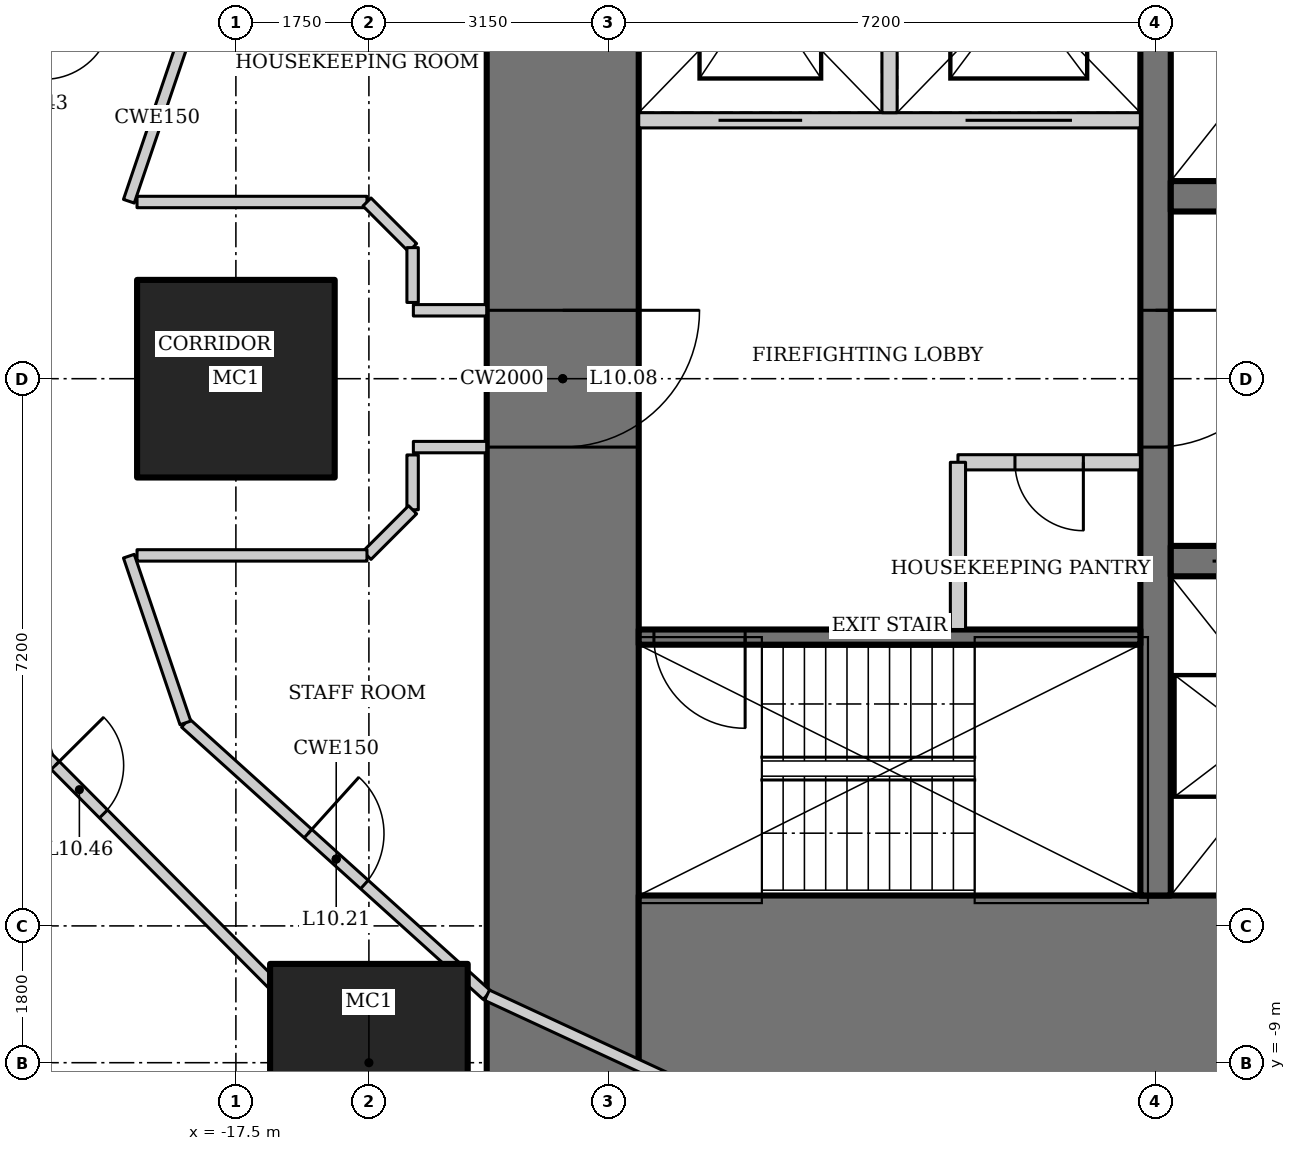
"""IFC4 building model, lengths in metres.
Left out: names, types, materials, properties, quantities, classifications, styles, units other than length and angle.
Written with IfcOpenShell. Run it as: python <this file> out.ifc"""

import sys

from ifc_helpers import new_model, si_unit, direction, frame, frame_2d, origin, origin_2d, place, context, subcontext, project, spatial, rectangle, hollow_rectangle, extrude, element, fill, save


model = new_model("IFC4")
c1 = context("Model", 3, precision=1e-05, world=origin(), true_north=direction((0.0, 1.0)))
c2 = subcontext(c1, "Body", "Model", "MODEL_VIEW")
j1 = project(units=[si_unit("LENGTHUNIT", "METRE"), si_unit("PLANEANGLEUNIT", "RADIAN")], contexts=[c1])
p1 = place(None, origin())
s1 = spatial("IfcSite", under=j1, at=p1, CompositionType="ELEMENT")
p2 = place(p1, origin())
s2 = spatial("IfcBuilding", under=s1, at=p2, CompositionType="ELEMENT")
p3 = place(p2, frame((0.0, 0.0, 51.4)))
s3 = spatial("IfcBuildingStorey", under=s2, at=p3, CompositionType="ELEMENT", Elevation=51.4)
for number, where, z_axis, x_axis in (
    (1, (-17.5, 0.0, 0.0), (0.0, 0.0, 1.0), (1.0, 0.0, 0.0)),
    (2, (-15.75, -9.0, 0.0), (0.0, 0.0, 1.0), (1.0, 0.0, 0.0)),
):
    element("IfcColumn", number, at=place(p3, frame(where, z_axis=z_axis, x_axis=x_axis)), inside=s3, PredefinedType="COLUMN", context=c2, shape_type="SweptSolid", body=[
        extrude(hollow_rectangle(XDim=2.6, YDim=2.6, WallThickness=0.13, at=origin_2d()), origin(), (0.0, 0.0, 1.0), 3.6),
    ])
p4 = place(p3, frame((-13.2, 13.0, 0.0), z_axis=(0.0, 0.0, 1.0), x_axis=(0.0, -1.0, 0.0)))
e3 = element("IfcWall", 3, at=p4, inside=s3, PredefinedType="SHEAR", context=c2, shape_type="SweptSolid", body=[
    extrude(rectangle(XDim=26.0, YDim=2.0, at=frame_2d((13.0, 0.0))), origin(), (0.0, 0.0, 1.0), 3.6),
])
p5 = place(p4, frame((12.1, 0.0, 0.0)))
e4 = element("IfcOpeningElement", 4, at=p5, cuts=e3, PredefinedType="OPENING", context=c2, shape_type="SweptSolid", body=[
    extrude(rectangle(XDim=1.8, YDim=2.1, at=frame_2d((0.9, 1.05))), frame((0.0, 1.01, 0.0), z_axis=(0.0, -1.0, 0.0), x_axis=(1.0, 0.0, 0.0)), (0.0, 0.0, 1.0), 2.02),
])
p6 = place(p3, frame((-12.2, -8.0, 0.0), z_axis=(0.0, 0.0, 1.0), x_axis=(1.0, 0.0, 0.0)))
e5 = element("IfcWall", 5, at=p6, inside=s3, PredefinedType="SHEAR", context=c2, shape_type="SweptSolid", body=[
    extrude(rectangle(XDim=24.4, YDim=2.4, at=frame_2d((12.2, 0.0))), origin(), (0.0, 0.0, 1.0), 3.6),
])
p7 = place(p3, frame((-5.4, 6.8, 0.0), z_axis=(0.0, 0.0, 1.0), x_axis=(0.0, -1.0, 0.0)))
e6 = element("IfcWall", 6, at=p7, inside=s3, PredefinedType="SHEAR", context=c2, shape_type="SweptSolid", body=[
    extrude(rectangle(XDim=13.6, YDim=0.4, at=frame_2d((6.8, 0.0))), origin(), (0.0, 0.0, 1.0), 3.6),
])
p8 = place(p7, frame((5.9, 0.0, 0.0)))
e7 = element("IfcOpeningElement", 7, at=p8, cuts=e6, PredefinedType="OPENING", context=c2, shape_type="SweptSolid", body=[
    extrude(rectangle(XDim=1.8, YDim=2.1, at=frame_2d((0.9, 1.05))), frame((0.0, 0.21, 0.0), z_axis=(0.0, -1.0, 0.0), x_axis=(1.0, 0.0, 0.0)), (0.0, 0.0, 1.0), 0.42),
])
p9 = place(p3, frame((-5.2, -2.4, 0.0), z_axis=(0.0, 0.0, 1.0), x_axis=(1.0, 0.0, 0.0)))
e8 = element("IfcWall", 8, at=p9, inside=s3, PredefinedType="SHEAR", context=c2, shape_type="SweptSolid", body=[
    extrude(rectangle(XDim=10.4, YDim=0.4, at=frame_2d((5.2, 0.0))), origin(), (0.0, 0.0, 1.0), 3.6),
])
p10 = place(p9, frame((0.55, 0.0, 0.0)))
e9 = element("IfcOpeningElement", 9, at=p10, cuts=e8, PredefinedType="OPENING", context=c2, shape_type="SweptSolid", body=[
    extrude(rectangle(XDim=1.1, YDim=2.2, at=frame_2d((0.55, 1.1))), frame((0.0, 0.21, 0.0), z_axis=(0.0, -1.0, 0.0), x_axis=(1.0, 0.0, 0.0)), (0.0, 0.0, 1.0), 0.42),
])
p11 = place(p9, frame((4.083, 0.0, 0.0)))
e10 = element("IfcOpeningElement", 10, at=p11, cuts=e8, PredefinedType="OPENING", context=c2, shape_type="SweptSolid", body=[
    extrude(rectangle(XDim=1.1, YDim=2.2, at=frame_2d((0.55, 1.1))), frame((0.0, 0.21, 0.0), z_axis=(0.0, -1.0, 0.0), x_axis=(1.0, 0.0, 0.0)), (0.0, 0.0, 1.0), 0.42),
])
p12 = place(p9, frame((7.617, 0.0, 0.0)))
e11 = element("IfcOpeningElement", 11, at=p12, cuts=e8, PredefinedType="OPENING", context=c2, shape_type="SweptSolid", body=[
    extrude(rectangle(XDim=1.1, YDim=2.2, at=frame_2d((0.55, 1.1))), frame((0.0, 0.21, 0.0), z_axis=(0.0, -1.0, 0.0), x_axis=(1.0, 0.0, 0.0)), (0.0, 0.0, 1.0), 0.42),
])
p13 = place(p3, frame((5.2, 2.4, 0.0), z_axis=(0.0, 0.0, 1.0), x_axis=(-1.0, 0.0, 0.0)))
e12 = element("IfcWall", 12, at=p13, inside=s3, PredefinedType="SHEAR", context=c2, shape_type="SweptSolid", body=[
    extrude(rectangle(XDim=10.4, YDim=0.4, at=frame_2d((5.2, 0.0))), origin(), (0.0, 0.0, 1.0), 3.6),
])
p14 = place(p3, frame((-5.6, -3.4, 0.0), z_axis=(0.0, 0.0, 1.0), x_axis=(-1.0, 0.0, 0.0)))
e13 = element("IfcWall", 13, at=p14, inside=s3, PredefinedType="SHEAR", context=c2, shape_type="SweptSolid", body=[
    extrude(rectangle(XDim=6.6, YDim=0.2, at=frame_2d((3.3, 0.0))), origin(), (0.0, 0.0, 1.0), 3.6),
])
p15 = place(p14, frame((5.2, 0.0, 0.0)))
e14 = element("IfcOpeningElement", 14, at=p15, cuts=e13, PredefinedType="OPENING", context=c2, shape_type="SweptSolid", body=[
    extrude(rectangle(XDim=1.2, YDim=2.1, at=frame_2d((0.6, 1.05))), frame((0.0, 0.11, 0.0), z_axis=(0.0, -1.0, 0.0), x_axis=(1.0, 0.0, 0.0)), (0.0, 0.0, 1.0), 0.22),
])
p16 = place(p3, frame((-12.2, 3.4, 0.0), z_axis=(0.0, 0.0, 1.0), x_axis=(1.0, 0.0, 0.0)))
e15 = element("IfcWall", 15, at=p16, inside=s3, PredefinedType="SOLIDWALL", context=c2, shape_type="SweptSolid", body=[
    extrude(rectangle(XDim=6.6, YDim=0.2, at=frame_2d((3.3, 0.0))), origin(), (0.0, 0.0, 1.0), 3.6),
])
p17 = place(p16, frame((1.05, 0.0, 0.0)))
e16 = element("IfcOpeningElement", 16, at=p17, cuts=e15, PredefinedType="OPENING", context=c2, shape_type="SweptSolid", body=[
    extrude(rectangle(XDim=1.1, YDim=2.2, at=frame_2d((0.55, 1.1))), frame((0.0, 0.11, 0.0), z_axis=(0.0, -1.0, 0.0), x_axis=(1.0, 0.0, 0.0)), (0.0, 0.0, 1.0), 0.22),
])
p18 = place(p16, frame((4.3, 0.0, 0.0)))
e17 = element("IfcOpeningElement", 17, at=p18, cuts=e15, PredefinedType="OPENING", context=c2, shape_type="SweptSolid", body=[
    extrude(rectangle(XDim=1.4, YDim=2.2, at=frame_2d((0.7, 1.1))), frame((0.0, 0.11, 0.0), z_axis=(0.0, -1.0, 0.0), x_axis=(1.0, 0.0, 0.0)), (0.0, 0.0, 1.0), 0.22),
])
p19 = place(p3, frame((-8.9, 3.5, 0.0), z_axis=(0.0, 0.0, 1.0), x_axis=(0.0, 1.0, 0.0)))
e18 = element("IfcWall", 18, at=p19, inside=s3, PredefinedType="SOLIDWALL", context=c2, shape_type="SweptSolid", body=[
    extrude(rectangle(XDim=3.3, YDim=0.2, at=frame_2d((1.65, 0.0))), origin(), (0.0, 0.0, 1.0), 3.6),
])
p20 = place(p3, frame((-5.6, -1.1, 0.0), z_axis=(0.0, 0.0, 1.0), x_axis=(-1.0, 0.0, 0.0)))
e19 = element("IfcWall", 19, at=p20, inside=s3, PredefinedType="SOLIDWALL", context=c2, shape_type="SweptSolid", body=[
    extrude(rectangle(XDim=2.4, YDim=0.2, at=frame_2d((1.2, 0.0))), origin(), (0.0, 0.0, 1.0), 3.45),
])
p21 = place(p20, frame((0.75, 0.0, 0.0)))
e20 = element("IfcOpeningElement", 20, at=p21, cuts=e19, PredefinedType="OPENING", context=c2, shape_type="SweptSolid", body=[
    extrude(rectangle(XDim=0.9, YDim=2.1, at=frame_2d((0.45, 1.05))), frame((0.0, 0.11, 0.0), z_axis=(0.0, -1.0, 0.0), x_axis=(1.0, 0.0, 0.0)), (0.0, 0.0, 1.0), 0.22),
])
p22 = place(p3, frame((-8.0, -1.1, 0.0), z_axis=(0.0, 0.0, 1.0), x_axis=(0.0, -1.0, 0.0)))
e21 = element("IfcWall", 21, at=p22, inside=s3, PredefinedType="SOLIDWALL", context=c2, shape_type="SweptSolid", body=[
    extrude(rectangle(XDim=2.2, YDim=0.2, at=frame_2d((1.1, 0.0))), origin(), (0.0, 0.0, 1.0), 3.45),
])
p23 = place(p3, frame((-24.435, -13.909, 0.0), z_axis=(0.0, 0.0, 1.0), x_axis=(0.870612006791, 0.491970256856, 0.0)))
e22 = element("IfcWall", 22, at=p23, inside=s3, PredefinedType="PARTITIONING", context=c2, shape_type="SweptSolid", body=[
    extrude(rectangle(XDim=9.802, YDim=0.15, at=frame_2d((4.901, 0.0))), origin(), (0.0, 0.0, 1.0), 2.693),
])
p24 = place(p3, frame((-19.982, 4.982, 0.0), z_axis=(0.0, 0.0, 1.0), x_axis=(-0.291383581394, -0.95660629754, 0.0)))
e23 = element("IfcWall", 23, at=p24, inside=s3, PredefinedType="PARTITIONING", context=c2, shape_type="SweptSolid", body=[
    extrude(rectangle(XDim=5.208, YDim=0.15, at=frame_2d((2.604, 0.0))), origin(), (0.0, 0.0, 1.0), 3.45),
])
p25 = place(p24, frame((0.15, 0.0, 0.0)))
e24 = element("IfcOpeningElement", 24, at=p25, cuts=e23, PredefinedType="OPENING", context=c2, shape_type="SweptSolid", body=[
    extrude(rectangle(XDim=0.9, YDim=2.1, at=frame_2d((0.45, 1.05))), frame((0.0, 0.085, 0.0), z_axis=(0.0, -1.0, 0.0), x_axis=(1.0, 0.0, 0.0)), (0.0, 0.0, 1.0), 0.17),
])
p26 = place(p3, frame((-21.5, 0.0, 0.0), z_axis=(0.0, 0.0, 1.0), x_axis=(0.291383581394, -0.95660629754, 0.0)))
e25 = element("IfcWall", 25, at=p26, inside=s3, PredefinedType="PARTITIONING", context=c2, shape_type="SweptSolid", body=[
    extrude(rectangle(XDim=5.208, YDim=0.15, at=frame_2d((2.604, 0.0))), origin(), (0.0, 0.0, 1.0), 3.45),
])
p27 = place(p3, frame((-19.982, -4.982, 0.0), z_axis=(0.0, 0.0, 1.0), x_axis=(0.705121546414, -0.709086457904, 0.0)))
e26 = element("IfcWall", 26, at=p27, inside=s3, PredefinedType="PARTITIONING", context=c2, shape_type="SweptSolid", body=[
    extrude(rectangle(XDim=5.788, YDim=0.15, at=frame_2d((2.894, 0.0))), origin(), (0.0, 0.0, 1.0), 3.45),
])
p28 = place(p27, frame((0.15, 0.0, 0.0)))
e27 = element("IfcOpeningElement", 27, at=p28, cuts=e26, PredefinedType="OPENING", context=c2, shape_type="SweptSolid", body=[
    extrude(rectangle(XDim=0.9, YDim=2.1, at=frame_2d((0.45, 1.05))), frame((0.0, 0.085, 0.0), z_axis=(0.0, -1.0, 0.0), x_axis=(1.0, 0.0, 0.0)), (0.0, 0.0, 1.0), 0.17),
])
p29 = place(p3, frame((-15.901, -9.086, 0.0), z_axis=(0.0, 0.0, 1.0), x_axis=(0.888333171507, -0.459199495209, 0.0)))
e28 = element("IfcWall", 28, at=p29, inside=s3, PredefinedType="PARTITIONING", context=c2, shape_type="SweptSolid", body=[
    extrude(rectangle(XDim=5.351, YDim=0.15, at=frame_2d((2.676, 0.0))), origin(), (0.0, 0.0, 1.0), 3.45),
])
p30 = place(p29, frame((4.301, 0.0, 0.0)))
e29 = element("IfcOpeningElement", 29, at=p30, cuts=e28, PredefinedType="OPENING", context=c2, shape_type="SweptSolid", body=[
    extrude(rectangle(XDim=0.9, YDim=2.1, at=frame_2d((0.45, 1.05))), frame((0.0, 0.085, 0.0), z_axis=(0.0, -1.0, 0.0), x_axis=(1.0, 0.0, 0.0)), (0.0, 0.0, 1.0), 0.17),
])
p31 = place(p3, frame((-18.164, -4.529, 0.0), z_axis=(0.0, 0.0, 1.0), x_axis=(0.742194222, -0.670184852731, 0.0)))
e30 = element("IfcWall", 30, at=p31, inside=s3, PredefinedType="PARTITIONING", context=c2, shape_type="SweptSolid", body=[
    extrude(rectangle(XDim=5.347, YDim=0.15, at=frame_2d((2.673, 0.0))), origin(), (0.0, 0.0, 1.0), 3.45),
])
p32 = place(p31, frame((2.173, 0.0, 0.0)))
e31 = element("IfcOpeningElement", 31, at=p32, cuts=e30, PredefinedType="OPENING", context=c2, shape_type="SweptSolid", body=[
    extrude(rectangle(XDim=1.0, YDim=2.1, at=frame_2d((0.5, 1.05))), frame((0.0, 0.085, 0.0), z_axis=(0.0, -1.0, 0.0), x_axis=(1.0, 0.0, 0.0)), (0.0, 0.0, 1.0), 0.17),
])
p33 = place(p3, frame((-14.196, -8.112, 0.0), z_axis=(0.0, 0.0, 1.0), x_axis=(0.907279653965, -0.420527798727, 0.0)))
e32 = element("IfcWall", 32, at=p33, inside=s3, PredefinedType="PARTITIONING", context=c2, shape_type="SweptSolid", body=[
    extrude(rectangle(XDim=4.844, YDim=0.15, at=frame_2d((2.422, 0.0))), origin(), (0.0, 0.0, 1.0), 3.45),
])
for number, where, z_axis, x_axis in (
    (33, (-18.164, 4.529, 0.0), (0.0, 0.0, 1.0), (-0.321, -0.947, 0.0)),
    (34, (-18.908, -2.335, 0.0), (0.0, 0.0, 1.0), (0.321, -0.947, 0.0)),
):
    element("IfcWall", number, at=place(p3, frame(where, z_axis=z_axis, x_axis=x_axis)), inside=s3, PredefinedType="PARTITIONING", context=c2, shape_type="SweptSolid", body=[
        extrude(rectangle(XDim=2.317, YDim=0.15, at=frame_2d((1.158, 0.0))), origin(), (0.0, 0.0, 1.0), 3.45),
    ])
for number, where, z_axis, x_axis in (
    (35, (-14.2, -0.9, 0.0), (0.0, 0.0, 1.0), (-1.0, 0.0, 0.0)),
    (36, (-14.2, 0.9, 0.0), (0.0, 0.0, 1.0), (-1.0, 0.0, 0.0)),
):
    element("IfcWall", number, at=place(p3, frame(where, z_axis=z_axis, x_axis=x_axis)), inside=s3, PredefinedType="PARTITIONING", context=c2, shape_type="SweptSolid", body=[
        extrude(rectangle(XDim=0.965, YDim=0.15, at=frame_2d((0.482, 0.0))), origin(), (0.0, 0.0, 1.0), 3.45),
    ])
p34 = place(p3, frame((-18.801, 2.325, 0.0), z_axis=(0.0, 0.0, 1.0), x_axis=(1.0, 0.0, 0.0)))
e37 = element("IfcWall", 37, at=p34, inside=s3, PredefinedType="PARTITIONING", context=c2, shape_type="SweptSolid", body=[
    extrude(rectangle(XDim=3.025, YDim=0.15, at=frame_2d((1.513, 0.0))), origin(), (0.0, 0.0, 1.0), 3.45),
])
p35 = place(p3, frame((-15.775, 2.325, 0.0), z_axis=(0.0, 0.0, 1.0), x_axis=(0.707106781187, -0.707106781187, 0.0)))
e38 = element("IfcWall", 38, at=p35, inside=s3, PredefinedType="PARTITIONING", context=c2, shape_type="SweptSolid", body=[
    extrude(rectangle(XDim=0.849, YDim=0.15, at=frame_2d((0.425, 0.0))), origin(), (0.0, 0.0, 1.0), 3.45),
])
for number, where, z_axis, x_axis in (
    (39, (-15.175, 1.725, 0.0), (0.0, 0.0, 1.0), (0.0, -1.0, 0.0)),
    (40, (-15.175, -1.003, 0.0), (0.0, 0.0, 1.0), (0.0, -1.0, 0.0)),
):
    element("IfcWall", number, at=place(p3, frame(where, z_axis=z_axis, x_axis=x_axis)), inside=s3, PredefinedType="PARTITIONING", context=c2, shape_type="SweptSolid", body=[
        extrude(rectangle(XDim=0.721, YDim=0.15, at=frame_2d((0.361, 0.0))), origin(), (0.0, 0.0, 1.0), 3.45),
    ])
p36 = place(p3, frame((-15.175, -1.725, 0.0), z_axis=(0.0, 0.0, 1.0), x_axis=(-0.707106781187, -0.707106781187, 0.0)))
e41 = element("IfcWall", 41, at=p36, inside=s3, PredefinedType="PARTITIONING", context=c2, shape_type="SweptSolid", body=[
    extrude(rectangle(XDim=0.849, YDim=0.15, at=frame_2d((0.425, 0.0))), origin(), (0.0, 0.0, 1.0), 3.45),
])
p37 = place(p3, frame((-15.775, -2.325, 0.0), z_axis=(0.0, 0.0, 1.0), x_axis=(-1.0, 0.0, 0.0)))
e42 = element("IfcWall", 42, at=p37, inside=s3, PredefinedType="PARTITIONING", context=c2, shape_type="SweptSolid", body=[
    extrude(rectangle(XDim=3.025, YDim=0.15, at=frame_2d((1.513, 0.0))), origin(), (0.0, 0.0, 1.0), 3.45),
])
p38 = place(p21, origin())
e43 = element("IfcDoor", 43, at=p38, inside=s3, OperationType="SINGLE_SWING_LEFT", PredefinedType="DOOR", context=c2, shape_type="SweptSolid", body=[
    extrude(rectangle(XDim=0.9, YDim=2.1, at=frame_2d((0.45, 1.05))), frame((0.0, 0.025, 0.0), z_axis=(0.0, -1.0, 0.0), x_axis=(1.0, 0.0, 0.0)), (0.0, 0.0, 1.0), 0.05),
])
fill(e20, e43)
p39 = place(p8, origin())
e44 = element("IfcDoor", 44, at=p39, inside=s3, OperationType="DOUBLE_DOOR_DOUBLE_SWING", PredefinedType="DOOR", context=c2, shape_type="SweptSolid", body=[
    extrude(rectangle(XDim=1.8, YDim=2.1, at=frame_2d((0.9, 1.05))), frame((0.0, 0.025, 0.0), z_axis=(0.0, -1.0, 0.0), x_axis=(1.0, 0.0, 0.0)), (0.0, 0.0, 1.0), 0.05),
])
fill(e7, e44)
p40 = place(p15, origin())
e45 = element("IfcDoor", 45, at=p40, inside=s3, OperationType="SINGLE_SWING_RIGHT", PredefinedType="DOOR", context=c2, shape_type="SweptSolid", body=[
    extrude(rectangle(XDim=1.2, YDim=2.1, at=frame_2d((0.6, 1.05))), frame((0.0, 0.025, 0.0), z_axis=(0.0, -1.0, 0.0), x_axis=(1.0, 0.0, 0.0)), (0.0, 0.0, 1.0), 0.05),
])
fill(e14, e45)
p41 = place(p5, origin())
e46 = element("IfcDoor", 46, at=p41, inside=s3, OperationType="DOUBLE_DOOR_DOUBLE_SWING", PredefinedType="DOOR", context=c2, shape_type="SweptSolid", body=[
    extrude(rectangle(XDim=1.8, YDim=2.1, at=frame_2d((0.9, 1.05))), frame((0.0, 0.025, 0.0), z_axis=(0.0, -1.0, 0.0), x_axis=(1.0, 0.0, 0.0)), (0.0, 0.0, 1.0), 0.05),
])
fill(e4, e46)
p42 = place(p10, origin())
e47 = element("IfcDoor", 47, at=p42, inside=s3, OperationType="DOUBLE_DOOR_SLIDING", PredefinedType="DOOR", context=c2, shape_type="SweptSolid", body=[
    extrude(rectangle(XDim=1.1, YDim=2.2, at=frame_2d((0.55, 1.1))), frame((0.0, 0.025, 0.0), z_axis=(0.0, -1.0, 0.0), x_axis=(1.0, 0.0, 0.0)), (0.0, 0.0, 1.0), 0.05),
])
fill(e9, e47)
p43 = place(p17, origin())
e48 = element("IfcDoor", 48, at=p43, inside=s3, OperationType="DOUBLE_DOOR_SLIDING", PredefinedType="DOOR", context=c2, shape_type="SweptSolid", body=[
    extrude(rectangle(XDim=1.1, YDim=2.2, at=frame_2d((0.55, 1.1))), frame((0.0, 0.025, 0.0), z_axis=(0.0, -1.0, 0.0), x_axis=(1.0, 0.0, 0.0)), (0.0, 0.0, 1.0), 0.05),
])
fill(e16, e48)
p44 = place(p18, origin())
e49 = element("IfcDoor", 49, at=p44, inside=s3, OperationType="DOUBLE_DOOR_SLIDING", PredefinedType="DOOR", context=c2, shape_type="SweptSolid", body=[
    extrude(rectangle(XDim=1.4, YDim=2.2, at=frame_2d((0.7, 1.1))), frame((0.0, 0.025, 0.0), z_axis=(0.0, -1.0, 0.0), x_axis=(1.0, 0.0, 0.0)), (0.0, 0.0, 1.0), 0.05),
])
fill(e17, e49)
p45 = place(p32, origin())
e50 = element("IfcDoor", 50, at=p45, inside=s3, OperationType="SINGLE_SWING_LEFT", PredefinedType="DOOR", context=c2, shape_type="SweptSolid", body=[
    extrude(rectangle(XDim=1.0, YDim=2.1, at=frame_2d((0.5, 1.05))), frame((0.0, 0.025, 0.0), z_axis=(0.0, -1.0, 0.0), x_axis=(1.0, 0.0, 0.0)), (0.0, 0.0, 1.0), 0.05),
])
fill(e31, e50)
p46 = place(p28, origin())
e51 = element("IfcDoor", 51, at=p46, inside=s3, OperationType="SINGLE_SWING_LEFT", PredefinedType="DOOR", context=c2, shape_type="SweptSolid", body=[
    extrude(rectangle(XDim=0.9, YDim=2.1, at=frame_2d((0.45, 1.05))), frame((0.0, 0.025, 0.0), z_axis=(0.0, -1.0, 0.0), x_axis=(1.0, 0.0, 0.0)), (0.0, 0.0, 1.0), 0.05),
])
fill(e27, e51)
save(model, sys.argv[1])
